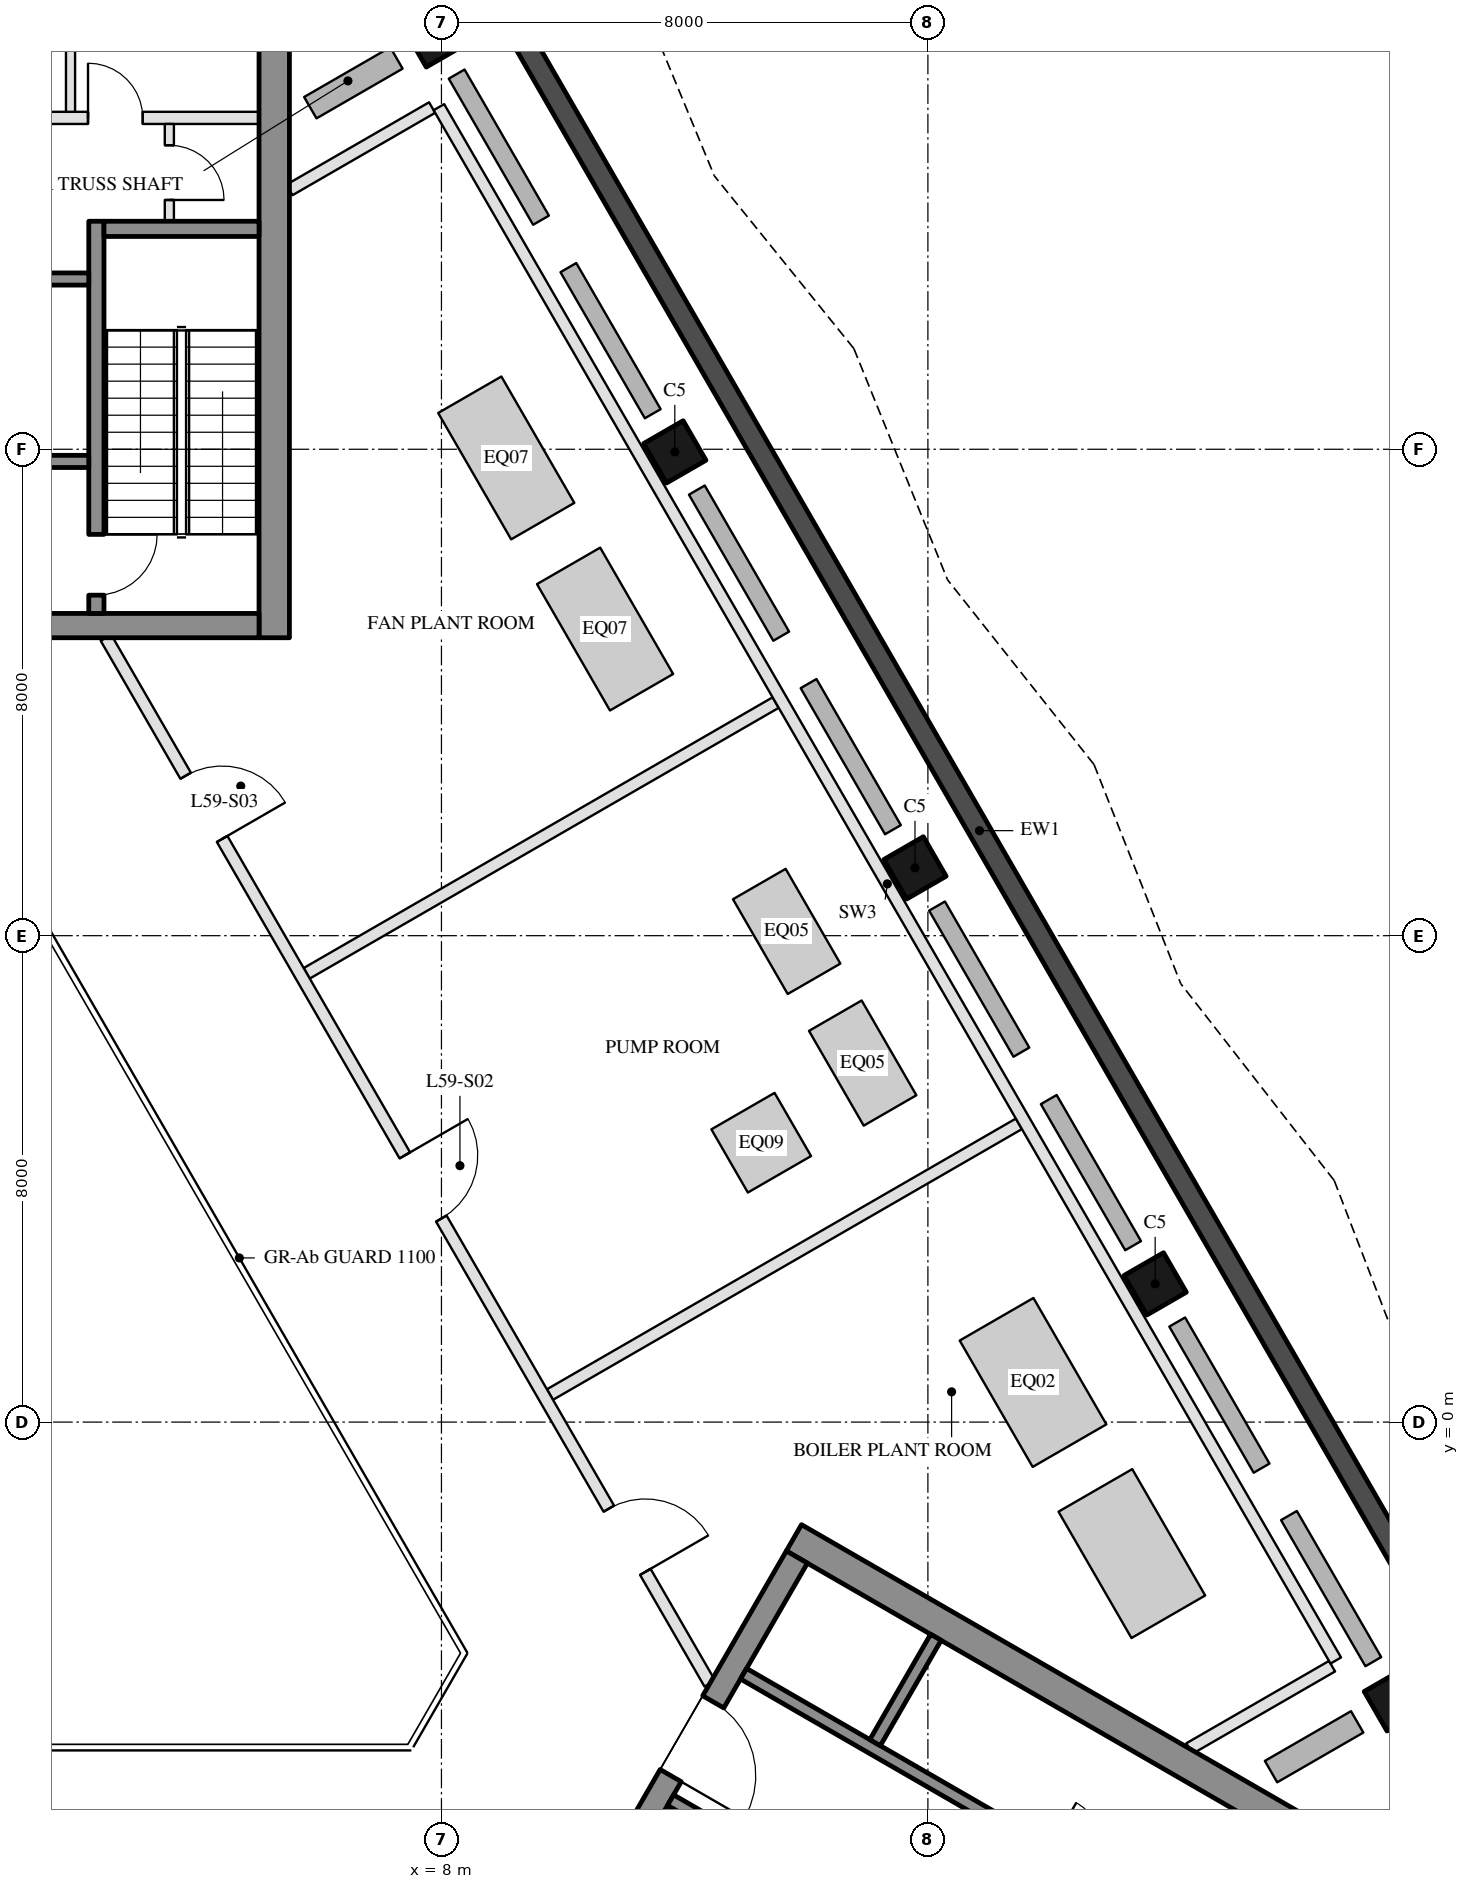
"""IFC4 building model, lengths in metres.
Left out: names, types, materials, properties, quantities, classifications, styles, units other than length and angle.
Written with IfcOpenShell. Run it as: python <this file> out.ifc"""

import sys

from ifc_helpers import new_model, si_unit, direction, frame, frame_2d, origin, origin_2d, place, context, subcontext, project, spatial, rectangle, hollow_rectangle, extrude, element, fill, save


model = new_model("IFC4")
c1 = context("Model", 3, precision=1e-05, world=origin(), true_north=direction((0.0, 1.0)))
c2 = subcontext(c1, "Body", "Model", "MODEL_VIEW")
j1 = project(units=[si_unit("LENGTHUNIT", "METRE"), si_unit("PLANEANGLEUNIT", "RADIAN")], contexts=[c1])
p1 = place(None, origin())
s1 = spatial("IfcSite", under=j1, at=p1, CompositionType="ELEMENT")
p2 = place(p1, origin())
s2 = spatial("IfcBuilding", under=s1, at=p2, CompositionType="ELEMENT")
p3 = place(p2, frame((0.0, 0.0, 242.2)))
s3 = spatial("IfcBuildingStorey", under=s2, at=p3, CompositionType="ELEMENT", Elevation=242.2)
for number, where, z_axis, x_axis in (
    (1, (23.688, -4.568, 0.0), (0.0, 0.0, 1.0), (-0.5, 0.866, 0.0)),
    (2, (19.738, 2.273, 0.0), (0.0, 0.0, 1.0), (-0.5, 0.866, 0.0)),
    (3, (15.788, 9.115, 0.0), (0.0, 0.0, 1.0), (-0.5, 0.866, 0.0)),
    (4, (11.838, 15.957, 0.0), (0.0, 0.0, 1.0), (-0.5, 0.866, 0.0)),
    (5, (7.888, 22.798, 0.0), (0.0, 0.0, 1.0), (-0.5, 0.866, 0.0)),
):
    element("IfcColumn", number, at=place(p3, frame(where, z_axis=z_axis, x_axis=x_axis)), inside=s3, PredefinedType="COLUMN", context=c2, shape_type="SweptSolid", body=[
        extrude(hollow_rectangle(XDim=0.75, YDim=0.75, WallThickness=0.035, at=origin_2d()), origin(), (0.0, 0.0, 1.0), 4.5),
    ])
p4 = place(p3, frame((26.256, -6.567, 0.0), z_axis=(0.0, 0.0, 1.0), x_axis=(-0.499998380999, 0.866026338513, 0.0)))
e6 = element("IfcWall", 6, at=p4, inside=s3, PredefinedType="SOLIDWALL", context=c2, shape_type="SweptSolid", body=[
    extrude(rectangle(XDim=37.631, YDim=0.35, at=frame_2d((18.816, 0.0))), origin(), (0.0, 0.0, 1.0), 4.35),
])
p5 = place(p3, frame((5.25, 12.9, 0.0), z_axis=(0.0, 0.0, 1.0), x_axis=(0.0, 1.0, 0.0)))
e7 = element("IfcWall", 7, at=p5, inside=s3, PredefinedType="SHEAR", context=c2, shape_type="SweptSolid", body=[
    extrude(rectangle(XDim=14.837, YDim=0.5, at=frame_2d((7.418, 0.0))), origin(), (0.0, 0.0, 1.0), 4.3),
])
p6 = place(p3, frame((5.0, 13.1, 0.0), z_axis=(0.0, 0.0, 1.0), x_axis=(-1.0, 0.0, 0.0)))
e8 = element("IfcWall", 8, at=p6, inside=s3, PredefinedType="SHEAR", context=c2, shape_type="SweptSolid", body=[
    extrude(rectangle(XDim=10.0, YDim=0.4, at=frame_2d((5.0, 0.0))), origin(), (0.0, 0.0, 1.0), 4.3),
])
p7 = place(p6, frame((3.55, 0.0, 0.0)))
e9 = element("IfcOpeningElement", 9, at=p7, cuts=e8, PredefinedType="OPENING", context=c2, shape_type="SweptSolid", body=[
    extrude(rectangle(XDim=1.1, YDim=2.1, at=frame_2d((0.55, 1.05))), frame((0.0, 0.21, 0.0), z_axis=(0.0, -1.0, 0.0), x_axis=(1.0, 0.0, 0.0)), (0.0, 0.0, 1.0), 0.42),
])
p8 = place(p6, frame((5.85, 0.0, 0.0)))
e10 = element("IfcOpeningElement", 10, at=p8, cuts=e8, PredefinedType="OPENING", context=c2, shape_type="SweptSolid", body=[
    extrude(rectangle(XDim=1.4, YDim=2.1, at=frame_2d((0.7, 1.05))), frame((0.0, 0.21, 0.0), z_axis=(0.0, -1.0, 0.0), x_axis=(1.0, 0.0, 0.0)), (0.0, 0.0, 1.0), 0.42),
])
p9 = place(p3, frame((2.325, 13.3, 0.0), z_axis=(0.0, 0.0, 1.0), x_axis=(0.0, 1.0, 0.0)))
e11 = element("IfcWall", 11, at=p9, inside=s3, PredefinedType="SHEAR", context=c2, shape_type="SweptSolid", body=[
    extrude(rectangle(XDim=6.45, YDim=0.25, at=frame_2d((3.225, 0.0))), origin(), (0.0, 0.0, 1.0), 4.3),
])
p10 = place(p9, frame((0.3, 0.0, 0.0)))
e12 = element("IfcOpeningElement", 12, at=p10, cuts=e11, PredefinedType="OPENING", context=c2, shape_type="SweptSolid", body=[
    extrude(rectangle(XDim=1.0, YDim=2.1, at=frame_2d((0.5, 1.05))), frame((0.0, 0.135, 0.0), z_axis=(0.0, -1.0, 0.0), x_axis=(1.0, 0.0, 0.0)), (0.0, 0.0, 1.0), 0.27),
])
p11 = place(p3, frame((5.0, 19.625, 0.0), z_axis=(0.0, 0.0, 1.0), x_axis=(-1.0, 0.0, 0.0)))
e13 = element("IfcWall", 13, at=p11, inside=s3, PredefinedType="SHEAR", context=c2, shape_type="SweptSolid", body=[
    extrude(rectangle(XDim=2.55, YDim=0.25, at=frame_2d((1.275, 0.0))), origin(), (0.0, 0.0, 1.0), 4.3),
])
p12 = place(p3, frame((2.2, 18.8, 0.0), z_axis=(0.0, 0.0, 1.0), x_axis=(-1.0, 0.0, 0.0)))
e14 = element("IfcWall", 14, at=p12, inside=s3, PredefinedType="SHEAR", context=c2, shape_type="SweptSolid", body=[
    extrude(rectangle(XDim=2.8, YDim=0.2, at=frame_2d((1.4, 0.0))), origin(), (0.0, 0.0, 1.0), 4.3),
])
p13 = place(p3, frame((2.2, 15.8, 0.0), z_axis=(0.0, 0.0, 1.0), x_axis=(-1.0, 0.0, 0.0)))
e15 = element("IfcWall", 15, at=p13, inside=s3, PredefinedType="SHEAR", context=c2, shape_type="SweptSolid", body=[
    extrude(rectangle(XDim=2.8, YDim=0.2, at=frame_2d((1.4, 0.0))), origin(), (0.0, 0.0, 1.0), 4.3),
])
p14 = place(p13, frame((0.7, 0.0, 0.0)))
e16 = element("IfcOpeningElement", 16, at=p14, cuts=e15, PredefinedType="OPENING", context=c2, shape_type="SweptSolid", body=[
    extrude(rectangle(XDim=1.2, YDim=2.1, at=frame_2d((0.6, 1.05))), frame((0.0, 0.11, 0.0), z_axis=(0.0, -1.0, 0.0), x_axis=(1.0, 0.0, 0.0)), (0.0, 0.0, 1.0), 0.22),
])
p15 = place(p3, frame((5.0, 21.45, 0.0), z_axis=(0.0, 0.0, 1.0), x_axis=(-1.0, 0.0, 0.0)))
e17 = element("IfcWall", 17, at=p15, inside=s3, PredefinedType="PARTITIONING", context=c2, shape_type="SweptSolid", body=[
    extrude(rectangle(XDim=5.4, YDim=0.2, at=frame_2d((2.7, 0.0))), origin(), (0.0, 0.0, 1.0), 4.3),
])
p16 = place(p15, frame((1.913, 0.0, 0.0)))
e18 = element("IfcOpeningElement", 18, at=p16, cuts=e17, PredefinedType="OPENING", context=c2, shape_type="SweptSolid", body=[
    extrude(rectangle(XDim=0.9, YDim=2.1, at=frame_2d((0.45, 1.05))), frame((0.0, 0.11, 0.0), z_axis=(0.0, -1.0, 0.0), x_axis=(1.0, 0.0, 0.0)), (0.0, 0.0, 1.0), 0.22),
])
p17 = place(p15, frame((3.788, 0.0, 0.0)))
e19 = element("IfcOpeningElement", 19, at=p17, cuts=e17, PredefinedType="OPENING", context=c2, shape_type="SweptSolid", body=[
    extrude(rectangle(XDim=0.9, YDim=2.1, at=frame_2d((0.45, 1.05))), frame((0.0, 0.11, 0.0), z_axis=(0.0, -1.0, 0.0), x_axis=(1.0, 0.0, 0.0)), (0.0, 0.0, 1.0), 0.22),
])
p18 = place(p3, frame((3.525, 19.75, 0.0), z_axis=(0.0, 0.0, 1.0), x_axis=(0.0, 1.0, 0.0)))
e20 = element("IfcWall", 20, at=p18, inside=s3, PredefinedType="PARTITIONING", context=c2, shape_type="SweptSolid", body=[
    extrude(rectangle(XDim=1.6, YDim=0.15, at=frame_2d((0.8, 0.0))), origin(), (0.0, 0.0, 1.0), 4.3),
])
p19 = place(p18, frame((0.35, 0.0, 0.0)))
e21 = element("IfcOpeningElement", 21, at=p19, cuts=e20, PredefinedType="OPENING", context=c2, shape_type="SweptSolid", body=[
    extrude(rectangle(XDim=0.9, YDim=2.1, at=frame_2d((0.45, 1.05))), frame((0.0, 0.085, 0.0), z_axis=(0.0, -1.0, 0.0), x_axis=(1.0, 0.0, 0.0)), (0.0, 0.0, 1.0), 0.17),
])
p20 = place(p3, frame((1.9, 21.55, 0.0), z_axis=(0.0, 0.0, 1.0), x_axis=(0.0, 1.0, 0.0)))
e22 = element("IfcWall", 22, at=p20, inside=s3, PredefinedType="PARTITIONING", context=c2, shape_type="SweptSolid", body=[
    extrude(rectangle(XDim=6.95, YDim=0.15, at=frame_2d((3.475, 0.0))), origin(), (0.0, 0.0, 1.0), 4.3),
])
p21 = place(p3, frame((13.797, -1.903, 0.0), z_axis=(0.0, 0.0, 1.0), x_axis=(0.866025009528, -0.500000682871, 0.0)))
e23 = element("IfcWall", 23, at=p21, inside=s3, PredefinedType="SHEAR", context=c2, shape_type="SweptSolid", body=[
    extrude(rectangle(XDim=14.837, YDim=0.5, at=frame_2d((7.418, 0.0))), origin(), (0.0, 0.0, 1.0), 4.3),
])
p22 = place(p3, frame((8.845, -10.88, 0.0), z_axis=(0.0, 0.0, 1.0), x_axis=(0.500004234368, 0.866022959057, 0.0)))
e24 = element("IfcWall", 24, at=p22, inside=s3, PredefinedType="SHEAR", context=c2, shape_type="SweptSolid", body=[
    extrude(rectangle(XDim=10.0, YDim=0.4, at=frame_2d((5.0, 0.0))), origin(), (0.0, 0.0, 1.0), 4.3),
])
p23 = place(p22, frame((3.55, 0.0, 0.0)))
e25 = element("IfcOpeningElement", 25, at=p23, cuts=e24, PredefinedType="OPENING", context=c2, shape_type="SweptSolid", body=[
    extrude(rectangle(XDim=1.1, YDim=2.1, at=frame_2d((0.55, 1.05))), frame((0.0, 0.21, 0.0), z_axis=(0.0, -1.0, 0.0), x_axis=(1.0, 0.0, 0.0)), (0.0, 0.0, 1.0), 0.42),
])
p24 = place(p22, frame((5.85, 0.0, 0.0)))
e26 = element("IfcOpeningElement", 26, at=p24, cuts=e24, PredefinedType="OPENING", context=c2, shape_type="SweptSolid", body=[
    extrude(rectangle(XDim=1.4, YDim=2.1, at=frame_2d((0.7, 1.05))), frame((0.0, 0.21, 0.0), z_axis=(0.0, -1.0, 0.0), x_axis=(1.0, 0.0, 0.0)), (0.0, 0.0, 1.0), 0.42),
])
p25 = place(p3, frame((11.768, -6.217, 0.0), z_axis=(0.0, 0.0, 1.0), x_axis=(0.866050077142, -0.499957262057, 0.0)))
e27 = element("IfcWall", 27, at=p25, inside=s3, PredefinedType="SHEAR", context=c2, shape_type="SweptSolid", body=[
    extrude(rectangle(XDim=2.4, YDim=0.2, at=frame_2d((1.2, 0.0))), origin(), (0.0, 0.0, 1.0), 4.3),
])
p26 = place(p3, frame((12.968, -4.138, 0.0), z_axis=(0.0, 0.0, 1.0), x_axis=(0.866028328073, -0.49999493495, 0.0)))
e28 = element("IfcWall", 28, at=p26, inside=s3, PredefinedType="SHEAR", context=c2, shape_type="SweptSolid", body=[
    extrude(rectangle(XDim=10.16, YDim=0.2, at=frame_2d((5.08, 0.0))), origin(), (0.0, 0.0, 1.0), 4.3),
])
p27 = place(p26, frame((5.8, 0.0, 0.0)))
e29 = element("IfcOpeningElement", 29, at=p27, cuts=e28, PredefinedType="OPENING", context=c2, shape_type="SweptSolid", body=[
    extrude(rectangle(XDim=0.9, YDim=2.1, at=frame_2d((0.45, 1.05))), frame((0.0, 0.11, 0.0), z_axis=(0.0, -1.0, 0.0), x_axis=(1.0, 0.0, 0.0)), (0.0, 0.0, 1.0), 0.22),
])
p28 = place(p3, frame((15.131, -5.272, 0.0), z_axis=(0.0, 0.0, 1.0), x_axis=(0.499972520799, 0.866041268327, 0.0)))
e30 = element("IfcWall", 30, at=p28, inside=s3, PredefinedType="SHEAR", context=c2, shape_type="SweptSolid", body=[
    extrude(rectangle(XDim=2.0, YDim=0.2, at=frame_2d((1.0, 0.0))), origin(), (0.0, 0.0, 1.0), 4.3),
])
p29 = place(p3, frame((22.646, -4.015, 0.0), z_axis=(0.0, 0.0, 1.0), x_axis=(-0.866044551023, -0.499966834543, 0.0)))
e31 = element("IfcWall", 31, at=p29, inside=s3, PredefinedType="PARTITIONING", context=c2, shape_type="SweptSolid", body=[
    extrude(rectangle(XDim=2.71, YDim=0.2, at=frame_2d((1.355, 0.0))), origin(), (0.0, 0.0, 1.0), 4.35),
])
for number, where, z_axis, x_axis in (
    (32, (17.496, 4.906, 0.0), (0.0, 0.0, 1.0), (-0.866, -0.5, 0.0)),
    (33, (13.496, 11.833, 0.0), (0.0, 0.0, 1.0), (-0.866, -0.5, 0.0)),
):
    element("IfcWall", number, at=place(p3, frame(where, z_axis=z_axis, x_axis=x_axis)), inside=s3, PredefinedType="PARTITIONING", context=c2, shape_type="SweptSolid", body=[
        extrude(rectangle(XDim=8.905, YDim=0.2, at=frame_2d((4.453, 0.0))), origin(), (0.0, 0.0, 1.0), 4.35),
    ])
p30 = place(p3, frame((7.846, 21.62, 0.0), z_axis=(0.0, 0.0, 1.0), x_axis=(-0.866022026288, -0.50000584995, 0.0)))
e34 = element("IfcWall", 34, at=p30, inside=s3, PredefinedType="PARTITIONING", context=c2, shape_type="SweptSolid", body=[
    extrude(rectangle(XDim=2.709, YDim=0.2, at=frame_2d((1.355, 0.0))), origin(), (0.0, 0.0, 1.0), 4.35),
])
p31 = place(p3, frame((22.708, -3.921, 0.0), z_axis=(0.0, 0.0, 1.0), x_axis=(-0.499998500593, 0.866026269466, 0.0)))
e35 = element("IfcWall", 35, at=p31, inside=s3, PredefinedType="PARTITIONING", context=c2, shape_type="SweptSolid", body=[
    extrude(rectangle(XDim=29.5, YDim=0.2, at=frame_2d((14.75, 0.0))), origin(), (0.0, 0.0, 1.0), 3.75),
])
p32 = place(p3, frame((12.413, -4.3, 0.0), z_axis=(0.0, 0.0, 1.0), x_axis=(-0.50000478328, 0.866022642139, 0.0)))
e36 = element("IfcWall", 36, at=p32, inside=s3, PredefinedType="PARTITIONING", context=c2, shape_type="SweptSolid", body=[
    extrude(rectangle(XDim=19.861, YDim=0.2, at=frame_2d((9.931, 0.0))), origin(), (0.0, 0.0, 1.0), 3.75),
])
p33 = place(p32, frame((2.121, 0.0, 0.0)))
e37 = element("IfcOpeningElement", 37, at=p33, cuts=e36, PredefinedType="OPENING", context=c2, shape_type="SweptSolid", body=[
    extrude(rectangle(XDim=1.2, YDim=2.1, at=frame_2d((0.6, 1.05))), frame((0.0, 0.11, 0.0), z_axis=(0.0, -1.0, 0.0), x_axis=(1.0, 0.0, 0.0)), (0.0, 0.0, 1.0), 0.22),
])
p34 = place(p32, frame((8.831, 0.0, 0.0)))
e38 = element("IfcOpeningElement", 38, at=p34, cuts=e36, PredefinedType="OPENING", context=c2, shape_type="SweptSolid", body=[
    extrude(rectangle(XDim=1.2, YDim=2.1, at=frame_2d((0.6, 1.05))), frame((0.0, 0.11, 0.0), z_axis=(0.0, -1.0, 0.0), x_axis=(1.0, 0.0, 0.0)), (0.0, 0.0, 1.0), 0.22),
])
p35 = place(p32, frame((16.04, 0.0, 0.0)))
e39 = element("IfcOpeningElement", 39, at=p35, cuts=e36, PredefinedType="OPENING", context=c2, shape_type="SweptSolid", body=[
    extrude(rectangle(XDim=1.2, YDim=2.1, at=frame_2d((0.6, 1.05))), frame((0.0, 0.11, 0.0), z_axis=(0.0, -1.0, 0.0), x_axis=(1.0, 0.0, 0.0)), (0.0, 0.0, 1.0), 0.22),
])
p36 = place(p19, frame((0.9, 0.0, 0.0), z_axis=(0.0, 0.0, 1.0), x_axis=(-1.0, 0.0, 0.0)))
e40 = element("IfcDoor", 40, at=p36, inside=s3, OperationType="SINGLE_SWING_RIGHT", PredefinedType="DOOR", context=c2, shape_type="SweptSolid", body=[
    extrude(rectangle(XDim=0.9, YDim=2.1, at=frame_2d((0.45, 1.05))), frame((0.0, 0.025, 0.0), z_axis=(0.0, -1.0, 0.0), x_axis=(1.0, 0.0, 0.0)), (0.0, 0.0, 1.0), 0.05),
])
fill(e21, e40)
p37 = place(p16, frame((0.9, 0.0, 0.0), z_axis=(0.0, 0.0, 1.0), x_axis=(-1.0, 0.0, 0.0)))
e41 = element("IfcDoor", 41, at=p37, inside=s3, OperationType="SINGLE_SWING_LEFT", PredefinedType="DOOR", context=c2, shape_type="SweptSolid", body=[
    extrude(rectangle(XDim=0.9, YDim=2.1, at=frame_2d((0.45, 1.05))), frame((0.0, 0.025, 0.0), z_axis=(0.0, -1.0, 0.0), x_axis=(1.0, 0.0, 0.0)), (0.0, 0.0, 1.0), 0.05),
])
fill(e18, e41)
p38 = place(p10, frame((1.0, 0.0, 0.0), z_axis=(0.0, 0.0, 1.0), x_axis=(-1.0, 0.0, 0.0)))
e42 = element("IfcDoor", 42, at=p38, inside=s3, OperationType="SINGLE_SWING_LEFT", PredefinedType="DOOR", context=c2, shape_type="SweptSolid", body=[
    extrude(rectangle(XDim=1.0, YDim=2.1, at=frame_2d((0.5, 1.05))), frame((0.0, 0.025, 0.0), z_axis=(0.0, -1.0, 0.0), x_axis=(1.0, 0.0, 0.0)), (0.0, 0.0, 1.0), 0.05),
])
fill(e12, e42)
p39 = place(p24, frame((1.4, 0.0, 0.0), z_axis=(0.0, 0.0, 1.0), x_axis=(-1.0, 0.0, 0.0)))
e43 = element("IfcDoor", 43, at=p39, inside=s3, OperationType="DOUBLE_DOOR_SINGLE_SWING", PredefinedType="DOOR", context=c2, shape_type="SweptSolid", body=[
    extrude(rectangle(XDim=1.4, YDim=2.1, at=frame_2d((0.7, 1.05))), frame((0.0, 0.025, 0.0), z_axis=(0.0, -1.0, 0.0), x_axis=(1.0, 0.0, 0.0)), (0.0, 0.0, 1.0), 0.05),
])
fill(e26, e43)
p40 = place(p33, frame((1.2, 0.0, 0.0), z_axis=(0.0, 0.0, 1.0), x_axis=(-1.0, 0.0, 0.0)))
e44 = element("IfcDoor", 44, at=p40, inside=s3, OperationType="SINGLE_SWING_RIGHT", PredefinedType="DOOR", context=c2, shape_type="SweptSolid", body=[
    extrude(rectangle(XDim=1.2, YDim=2.1, at=frame_2d((0.6, 1.05))), frame((0.0, 0.025, 0.0), z_axis=(0.0, -1.0, 0.0), x_axis=(1.0, 0.0, 0.0)), (0.0, 0.0, 1.0), 0.05),
])
fill(e37, e44)
p41 = place(p34, frame((1.2, 0.0, 0.0), z_axis=(0.0, 0.0, 1.0), x_axis=(-1.0, 0.0, 0.0)))
e45 = element("IfcDoor", 45, at=p41, inside=s3, OperationType="SINGLE_SWING_LEFT", PredefinedType="DOOR", context=c2, shape_type="SweptSolid", body=[
    extrude(rectangle(XDim=1.2, YDim=2.1, at=frame_2d((0.6, 1.05))), frame((0.0, 0.025, 0.0), z_axis=(0.0, -1.0, 0.0), x_axis=(1.0, 0.0, 0.0)), (0.0, 0.0, 1.0), 0.05),
])
fill(e38, e45)
p42 = place(p35, frame((1.2, 0.0, 0.0), z_axis=(0.0, 0.0, 1.0), x_axis=(-1.0, 0.0, 0.0)))
e46 = element("IfcDoor", 46, at=p42, inside=s3, OperationType="SINGLE_SWING_RIGHT", PredefinedType="DOOR", context=c2, shape_type="SweptSolid", body=[
    extrude(rectangle(XDim=1.2, YDim=2.1, at=frame_2d((0.6, 1.05))), frame((0.0, 0.025, 0.0), z_axis=(0.0, -1.0, 0.0), x_axis=(1.0, 0.0, 0.0)), (0.0, 0.0, 1.0), 0.05),
])
fill(e39, e46)
save(model, sys.argv[1])
